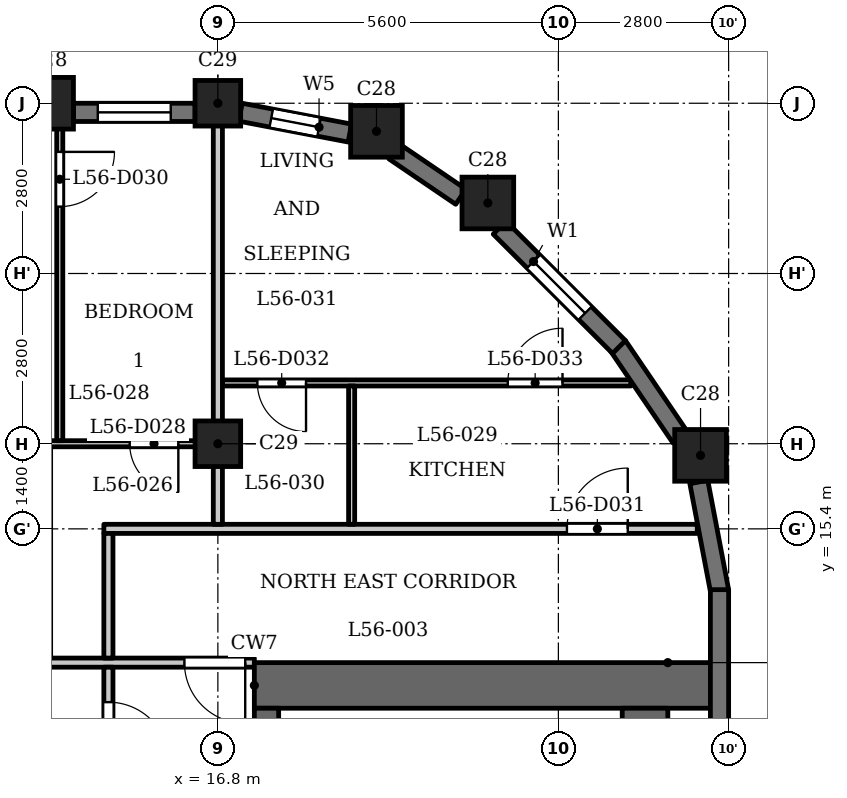
"""IFC4 building model, lengths in metres.
Left out: names, types, materials, properties, quantities, classifications, styles, units other than length and angle.
Written with IfcOpenShell. Run it as: python <this file> out.ifc"""

import sys

from ifc_helpers import new_model, si_unit, direction, frame, frame_2d, origin, origin_2d, place, context, subcontext, project, spatial, rectangle, extrude, element, fill, save


model = new_model("IFC4")
c1 = context("Model", 3, precision=1e-05, world=origin(), true_north=direction((0.0, 1.0)))
c2 = subcontext(c1, "Body", "Model", "MODEL_VIEW")
j1 = project(units=[si_unit("LENGTHUNIT", "METRE"), si_unit("PLANEANGLEUNIT", "RADIAN")], contexts=[c1])
p1 = place(None, origin())
s1 = spatial("IfcSite", under=j1, at=p1, CompositionType="ELEMENT")
p2 = place(p1, origin())
s2 = spatial("IfcBuilding", under=s1, at=p2, CompositionType="ELEMENT")
p3 = place(p2, frame((0.0, 0.0, 216.9)))
s3 = spatial("IfcBuildingStorey", under=s2, at=p3, CompositionType="ELEMENT", Elevation=216.9)
for number, where, z_axis, x_axis in (
    (1, (24.738, 16.609, 0.0), (0.0, 0.0, 1.0), (1.0, 0.0, 0.0)),
    (2, (21.24, 20.76, 0.0), (0.0, 0.0, 1.0), (1.0, 0.0, 0.0)),
    (3, (19.409, 21.938, 0.0), (0.0, 0.0, 1.0), (1.0, 0.0, 0.0)),
    (4, (14.0, 22.4, 0.0), (0.0, 0.0, 1.0), (1.0, 0.0, 0.0)),
):
    element("IfcColumn", number, at=place(p3, frame(where, z_axis=z_axis, x_axis=x_axis)), inside=s3, PredefinedType="COLUMN", context=c2, shape_type="SweptSolid", body=[
        extrude(rectangle(XDim=0.85, YDim=0.85, at=origin_2d()), origin(), (0.0, 0.0, 1.0), 3.5),
    ])
for number, where, z_axis, x_axis in (
    (5, (16.8, 16.8, 0.0), (0.0, 0.0, 1.0), (1.0, 0.0, 0.0)),
    (6, (16.8, 22.4, 0.0), (0.0, 0.0, 1.0), (1.0, 0.0, 0.0)),
):
    element("IfcColumn", number, at=place(p3, frame(where, z_axis=z_axis, x_axis=x_axis)), inside=s3, PredefinedType="COLUMN", context=c2, shape_type="SweptSolid", body=[
        extrude(rectangle(XDim=0.75, YDim=0.75, at=origin_2d()), origin(), (0.0, 0.0, 1.0), 3.5),
    ])
p4 = place(p3, frame((25.05, 11.625, 0.0), z_axis=(0.0, 0.0, 1.0), x_axis=(0.0, 1.0, 0.0)))
e7 = element("IfcWall", 7, at=p4, inside=s3, PredefinedType="SOLIDWALL", context=c2, shape_type="SweptSolid", body=[
    extrude(rectangle(XDim=2.775, YDim=0.3, at=frame_2d((1.387, 0.0))), origin(), (0.0, 0.0, 1.0), 2.5),
])
for number, where, z_axis, x_axis in (
    (8, (25.053, 14.372, 0.0), (0.0, 0.0, 1.0), (-0.187, 0.982, 0.0)),
    (9, (24.408, 16.898, 0.0), (0.0, 0.0, 1.0), (-0.562, 0.827, 0.0)),
):
    element("IfcWall", number, at=place(p3, frame(where, z_axis=z_axis, x_axis=x_axis)), inside=s3, PredefinedType="SOLIDWALL", context=c2, shape_type="SweptSolid", body=[
        extrude(rectangle(XDim=1.831, YDim=0.3, at=frame_2d((0.916, 0.0))), origin(), (0.0, 0.0, 1.0), 2.5),
    ])
p5 = place(p3, frame((23.397, 18.391, 0.0), z_axis=(0.0, 0.0, 1.0), x_axis=(-0.707106781187, 0.707106781187, 0.0)))
e10 = element("IfcWall", 10, at=p5, inside=s3, PredefinedType="SOLIDWALL", context=c2, shape_type="SweptSolid", body=[
    extrude(rectangle(XDim=2.775, YDim=0.3, at=frame_2d((1.388, 0.0))), origin(), (0.0, 0.0, 1.0), 2.5),
])
p6 = place(p5, frame((0.788, 0.0, 0.6)))
e11 = element("IfcOpeningElement", 11, at=p6, cuts=e10, PredefinedType="OPENING", context=c2, shape_type="SweptSolid", body=[
    extrude(rectangle(XDim=1.2, YDim=1.55, at=frame_2d((0.6, 0.775))), frame((0.0, 0.16, 0.0), z_axis=(0.0, -1.0, 0.0), x_axis=(1.0, 0.0, 0.0)), (0.0, 0.0, 1.0), 0.32),
])
p7 = place(p3, frame((20.796, 20.862, 0.0), z_axis=(0.0, 0.0, 1.0), x_axis=(-0.827035970432, 0.562149004813, 0.0)))
e12 = element("IfcWall", 12, at=p7, inside=s3, PredefinedType="SOLIDWALL", context=c2, shape_type="SweptSolid", body=[
    extrude(rectangle(XDim=1.327, YDim=0.3, at=frame_2d((0.664, 0.0))), origin(), (0.0, 0.0, 1.0), 2.5),
])
p8 = place(p3, frame((18.971, 21.91, 0.0), z_axis=(0.0, 0.0, 1.0), x_axis=(-0.982300037503, 0.187314271538, 0.0)))
e13 = element("IfcWall", 13, at=p8, inside=s3, PredefinedType="SOLIDWALL", context=c2, shape_type="SweptSolid", body=[
    extrude(rectangle(XDim=1.831, YDim=0.3, at=frame_2d((0.916, 0.0))), origin(), (0.0, 0.0, 1.0), 2.5),
])
p9 = place(p8, frame((0.516, 0.0, 0.6)))
e14 = element("IfcOpeningElement", 14, at=p9, cuts=e13, PredefinedType="OPENING", context=c2, shape_type="SweptSolid", body=[
    extrude(rectangle(XDim=0.8, YDim=1.55, at=frame_2d((0.4, 0.775))), frame((0.0, 0.16, 0.0), z_axis=(0.0, -1.0, 0.0), x_axis=(1.0, 0.0, 0.0)), (0.0, 0.0, 1.0), 0.32),
])
p10 = place(p3, frame((16.425, 22.25, 0.0), z_axis=(0.0, 0.0, 1.0), x_axis=(-1.0, 0.0, 0.0)))
e15 = element("IfcWall", 15, at=p10, inside=s3, PredefinedType="SOLIDWALL", context=c2, shape_type="SweptSolid", body=[
    extrude(rectangle(XDim=2.0, YDim=0.3, at=frame_2d((1.0, 0.0))), origin(), (0.0, 0.0, 1.0), 2.5),
])
p11 = place(p10, frame((0.4, 0.0, 0.6)))
e16 = element("IfcOpeningElement", 16, at=p11, cuts=e15, PredefinedType="OPENING", context=c2, shape_type="SweptSolid", body=[
    extrude(rectangle(XDim=1.2, YDim=1.55, at=frame_2d((0.6, 0.775))), frame((0.0, 0.16, 0.0), z_axis=(0.0, -1.0, 0.0), x_axis=(1.0, 0.0, 0.0)), (0.0, 0.0, 1.0), 0.32),
])
p12 = place(p3, frame((17.4, 12.825, 0.0), z_axis=(0.0, 0.0, 1.0), x_axis=(1.0, 0.0, 0.0)))
e17 = element("IfcWall", 17, at=p12, inside=s3, PredefinedType="SHEAR", context=c2, shape_type="SweptSolid", body=[
    extrude(rectangle(XDim=7.6, YDim=0.75, at=frame_2d((3.8, 0.0))), origin(), (0.0, 0.0, 1.0), 3.2),
])
p13 = place(p3, frame((17.6, -12.45, 0.0), z_axis=(0.0, 0.0, 1.0), x_axis=(0.0, 1.0, 0.0)))
e18 = element("IfcWall", 18, at=p13, inside=s3, PredefinedType="SHEAR", context=c2, shape_type="SweptSolid", body=[
    extrude(rectangle(XDim=24.9, YDim=0.4, at=frame_2d((12.45, 0.0))), origin(), (0.0, 0.0, 1.0), 3.2),
])
p14 = place(p13, frame((6.85, 0.0, 0.0)))
e19 = element("IfcOpeningElement", 19, at=p14, cuts=e18, PredefinedType="OPENING", context=c2, shape_type="SweptSolid", body=[
    extrude(rectangle(XDim=0.9, YDim=2.1, at=frame_2d((0.45, 1.05))), frame((0.0, 0.21, 0.0), z_axis=(0.0, -1.0, 0.0), x_axis=(1.0, 0.0, 0.0)), (0.0, 0.0, 1.0), 0.42),
])
p15 = place(p13, frame((10.45, 0.0, 0.0)))
e20 = element("IfcOpeningElement", 20, at=p15, cuts=e18, PredefinedType="OPENING", context=c2, shape_type="SweptSolid", body=[
    extrude(rectangle(XDim=0.9, YDim=2.1, at=frame_2d((0.45, 1.05))), frame((0.0, 0.21, 0.0), z_axis=(0.0, -1.0, 0.0), x_axis=(1.0, 0.0, 0.0)), (0.0, 0.0, 1.0), 0.42),
])
p16 = place(p13, frame((15.6, 0.0, 0.0)))
e21 = element("IfcOpeningElement", 21, at=p16, cuts=e18, PredefinedType="OPENING", context=c2, shape_type="SweptSolid", body=[
    extrude(rectangle(XDim=1.1, YDim=2.1, at=frame_2d((0.55, 1.05))), frame((0.0, 0.21, 0.0), z_axis=(0.0, -1.0, 0.0), x_axis=(1.0, 0.0, 0.0)), (0.0, 0.0, 1.0), 0.42),
])
p17 = place(p13, frame((18.0, 0.0, 0.0)))
e22 = element("IfcOpeningElement", 22, at=p17, cuts=e18, PredefinedType="OPENING", context=c2, shape_type="SweptSolid", body=[
    extrude(rectangle(XDim=1.1, YDim=2.1, at=frame_2d((0.55, 1.05))), frame((0.0, 0.21, 0.0), z_axis=(0.0, -1.0, 0.0), x_axis=(1.0, 0.0, 0.0)), (0.0, 0.0, 1.0), 0.42),
])
p18 = place(p13, frame((23.025, 0.0, 0.0)))
e23 = element("IfcOpeningElement", 23, at=p18, cuts=e18, PredefinedType="OPENING", context=c2, shape_type="SweptSolid", body=[
    extrude(rectangle(XDim=1.1, YDim=2.1, at=frame_2d((0.55, 1.05))), frame((0.0, 0.21, 0.0), z_axis=(0.0, -1.0, 0.0), x_axis=(1.0, 0.0, 0.0)), (0.0, 0.0, 1.0), 0.42),
])
p19 = place(p13, frame((0.775, 0.0, 0.0)))
e24 = element("IfcOpeningElement", 24, at=p19, cuts=e18, PredefinedType="OPENING", context=c2, shape_type="SweptSolid", body=[
    extrude(rectangle(XDim=1.1, YDim=2.1, at=frame_2d((0.55, 1.05))), frame((0.0, 0.21, 0.0), z_axis=(0.0, -1.0, 0.0), x_axis=(1.0, 0.0, 0.0)), (0.0, 0.0, 1.0), 0.42),
])
p20 = place(p13, frame((12.925, 0.0, 0.0)))
e25 = element("IfcOpeningElement", 25, at=p20, cuts=e18, PredefinedType="OPENING", context=c2, shape_type="SweptSolid", body=[
    extrude(rectangle(XDim=1.8, YDim=2.1, at=frame_2d((0.9, 1.05))), frame((0.0, 0.21, 0.0), z_axis=(0.0, -1.0, 0.0), x_axis=(1.0, 0.0, 0.0)), (0.0, 0.0, 1.0), 0.42),
])
p21 = place(p3, frame((23.825, -12.45, 0.0), z_axis=(0.0, 0.0, 1.0), x_axis=(0.0, 1.0, 0.0)))
e26 = element("IfcWall", 26, at=p21, inside=s3, PredefinedType="SHEAR", context=c2, shape_type="SweptSolid", body=[
    extrude(rectangle(XDim=24.9, YDim=0.75, at=frame_2d((12.45, 0.0))), origin(), (0.0, 0.0, 1.0), 3.2),
])
p22 = place(p3, frame((-17.4, 13.2, 0.0), z_axis=(0.0, 0.0, 1.0), x_axis=(1.0, 0.0, 0.0)))
e27 = element("IfcWall", 27, at=p22, inside=s3, PredefinedType="PARTITIONING", context=c2, shape_type="SweptSolid", body=[
    extrude(rectangle(XDim=34.8, YDim=0.15, at=frame_2d((17.4, 0.0))), origin(), (0.0, 0.0, 1.0), 3.2),
])
p23 = place(p22, frame((0.25, 0.0, 0.0)))
e28 = element("IfcOpeningElement", 28, at=p23, cuts=e27, PredefinedType="OPENING", context=c2, shape_type="SweptSolid", body=[
    extrude(rectangle(XDim=1.0, YDim=2.1, at=frame_2d((0.5, 1.05))), frame((0.0, 0.085, 0.0), z_axis=(0.0, -1.0, 0.0), x_axis=(1.0, 0.0, 0.0)), (0.0, 0.0, 1.0), 0.17),
])
p24 = place(p22, frame((33.65, 0.0, 0.0)))
e29 = element("IfcOpeningElement", 29, at=p24, cuts=e27, PredefinedType="OPENING", context=c2, shape_type="SweptSolid", body=[
    extrude(rectangle(XDim=1.0, YDim=2.1, at=frame_2d((0.5, 1.05))), frame((0.0, 0.085, 0.0), z_axis=(0.0, -1.0, 0.0), x_axis=(1.0, 0.0, 0.0)), (0.0, 0.0, 1.0), 0.17),
])
p25 = place(p22, frame((15.75, 0.0, 0.0)))
e30 = element("IfcOpeningElement", 30, at=p25, cuts=e27, PredefinedType="OPENING", context=c2, shape_type="SweptSolid", body=[
    extrude(rectangle(XDim=1.0, YDim=2.1, at=frame_2d((0.5, 1.05))), frame((0.0, 0.085, 0.0), z_axis=(0.0, -1.0, 0.0), x_axis=(1.0, 0.0, 0.0)), (0.0, 0.0, 1.0), 0.17),
])
p26 = place(p22, frame((26.95, 0.0, 0.0)))
e31 = element("IfcOpeningElement", 31, at=p26, cuts=e27, PredefinedType="OPENING", context=c2, shape_type="SweptSolid", body=[
    extrude(rectangle(XDim=1.0, YDim=2.1, at=frame_2d((0.5, 1.05))), frame((0.0, 0.085, 0.0), z_axis=(0.0, -1.0, 0.0), x_axis=(1.0, 0.0, 0.0)), (0.0, 0.0, 1.0), 0.17),
])
p27 = place(p22, frame((29.75, 0.0, 0.0)))
e32 = element("IfcOpeningElement", 32, at=p27, cuts=e27, PredefinedType="OPENING", context=c2, shape_type="SweptSolid", body=[
    extrude(rectangle(XDim=1.0, YDim=2.1, at=frame_2d((0.5, 1.05))), frame((0.0, 0.085, 0.0), z_axis=(0.0, -1.0, 0.0), x_axis=(1.0, 0.0, 0.0)), (0.0, 0.0, 1.0), 0.17),
])
p28 = place(p3, frame((14.925, 15.4, 0.0), z_axis=(0.0, 0.0, 1.0), x_axis=(1.0, 0.0, 0.0)))
e33 = element("IfcWall", 33, at=p28, inside=s3, PredefinedType="PARTITIONING", context=c2, shape_type="SweptSolid", body=[
    extrude(rectangle(XDim=9.759, YDim=0.15, at=frame_2d((4.879, 0.0))), origin(), (0.0, 0.0, 1.0), 3.2),
])
p29 = place(p28, frame((7.616, 0.0, 0.0)))
e34 = element("IfcOpeningElement", 34, at=p29, cuts=e33, PredefinedType="OPENING", context=c2, shape_type="SweptSolid", body=[
    extrude(rectangle(XDim=1.0, YDim=2.1, at=frame_2d((0.5, 1.05))), frame((0.0, 0.085, 0.0), z_axis=(0.0, -1.0, 0.0), x_axis=(1.0, 0.0, 0.0)), (0.0, 0.0, 1.0), 0.17),
])
p30 = place(p3, frame((-16.725, 16.8, 0.0), z_axis=(0.0, 0.0, 1.0), x_axis=(1.0, 0.0, 0.0)))
e35 = element("IfcWall", 35, at=p30, inside=s3, PredefinedType="PARTITIONING", context=c2, shape_type="SweptSolid", body=[
    extrude(rectangle(XDim=33.45, YDim=0.1, at=frame_2d((16.725, 0.0))), origin(), (0.0, 0.0, 1.0), 3.2),
])
p31 = place(p30, frame((11.675, 0.0, 0.0)))
e36 = element("IfcOpeningElement", 36, at=p31, cuts=e35, PredefinedType="OPENING", context=c2, shape_type="SweptSolid", body=[
    extrude(rectangle(XDim=0.9, YDim=2.1, at=frame_2d((0.45, 1.05))), frame((0.0, 0.06, 0.0), z_axis=(0.0, -1.0, 0.0), x_axis=(1.0, 0.0, 0.0)), (0.0, 0.0, 1.0), 0.12),
])
p32 = place(p30, frame((9.575, 0.0, 0.0)))
e37 = element("IfcOpeningElement", 37, at=p32, cuts=e35, PredefinedType="OPENING", context=c2, shape_type="SweptSolid", body=[
    extrude(rectangle(XDim=0.9, YDim=2.1, at=frame_2d((0.45, 1.05))), frame((0.0, 0.06, 0.0), z_axis=(0.0, -1.0, 0.0), x_axis=(1.0, 0.0, 0.0)), (0.0, 0.0, 1.0), 0.12),
])
p33 = place(p30, frame((17.375, 0.0, 0.0)))
e38 = element("IfcOpeningElement", 38, at=p33, cuts=e35, PredefinedType="OPENING", context=c2, shape_type="SweptSolid", body=[
    extrude(rectangle(XDim=0.8, YDim=2.1, at=frame_2d((0.4, 1.05))), frame((0.0, 0.06, 0.0), z_axis=(0.0, -1.0, 0.0), x_axis=(1.0, 0.0, 0.0)), (0.0, 0.0, 1.0), 0.12),
])
p34 = place(p30, frame((19.525, 0.0, 0.0)))
e39 = element("IfcOpeningElement", 39, at=p34, cuts=e35, PredefinedType="OPENING", context=c2, shape_type="SweptSolid", body=[
    extrude(rectangle(XDim=0.9, YDim=2.1, at=frame_2d((0.45, 1.05))), frame((0.0, 0.06, 0.0), z_axis=(0.0, -1.0, 0.0), x_axis=(1.0, 0.0, 0.0)), (0.0, 0.0, 1.0), 0.12),
])
p35 = place(p30, frame((23.775, 0.0, 0.0)))
e40 = element("IfcOpeningElement", 40, at=p35, cuts=e35, PredefinedType="OPENING", context=c2, shape_type="SweptSolid", body=[
    extrude(rectangle(XDim=0.9, YDim=2.1, at=frame_2d((0.45, 1.05))), frame((0.0, 0.06, 0.0), z_axis=(0.0, -1.0, 0.0), x_axis=(1.0, 0.0, 0.0)), (0.0, 0.0, 1.0), 0.12),
])
p36 = place(p30, frame((26.125, 0.0, 0.0)))
e41 = element("IfcOpeningElement", 41, at=p36, cuts=e35, PredefinedType="OPENING", context=c2, shape_type="SweptSolid", body=[
    extrude(rectangle(XDim=0.9, YDim=2.1, at=frame_2d((0.45, 1.05))), frame((0.0, 0.06, 0.0), z_axis=(0.0, -1.0, 0.0), x_axis=(1.0, 0.0, 0.0)), (0.0, 0.0, 1.0), 0.12),
])
p37 = place(p30, frame((32.075, 0.0, 0.0)))
e42 = element("IfcOpeningElement", 42, at=p37, cuts=e35, PredefinedType="OPENING", context=c2, shape_type="SweptSolid", body=[
    extrude(rectangle(XDim=0.8, YDim=2.1, at=frame_2d((0.4, 1.05))), frame((0.0, 0.06, 0.0), z_axis=(0.0, -1.0, 0.0), x_axis=(1.0, 0.0, 0.0)), (0.0, 0.0, 1.0), 0.12),
])
p38 = place(p30, frame((29.175, 0.0, 0.0)))
e43 = element("IfcOpeningElement", 43, at=p38, cuts=e35, PredefinedType="OPENING", context=c2, shape_type="SweptSolid", body=[
    extrude(rectangle(XDim=0.9, YDim=2.1, at=frame_2d((0.45, 1.05))), frame((0.0, 0.06, 0.0), z_axis=(0.0, -1.0, 0.0), x_axis=(1.0, 0.0, 0.0)), (0.0, 0.0, 1.0), 0.12),
])
p39 = place(p3, frame((16.875, 17.8, 0.0), z_axis=(0.0, 0.0, 1.0), x_axis=(1.0, 0.0, 0.0)))
e44 = element("IfcWall", 44, at=p39, inside=s3, PredefinedType="PARTITIONING", context=c2, shape_type="SweptSolid", body=[
    extrude(rectangle(XDim=6.719, YDim=0.1, at=frame_2d((3.359, 0.0))), origin(), (0.0, 0.0, 1.0), 3.2),
])
p40 = place(p39, frame((0.575, 0.0, 0.0)))
e45 = element("IfcOpeningElement", 45, at=p40, cuts=e44, PredefinedType="OPENING", context=c2, shape_type="SweptSolid", body=[
    extrude(rectangle(XDim=0.8, YDim=2.1, at=frame_2d((0.4, 1.05))), frame((0.0, 0.06, 0.0), z_axis=(0.0, -1.0, 0.0), x_axis=(1.0, 0.0, 0.0)), (0.0, 0.0, 1.0), 0.12),
])
p41 = place(p39, frame((4.693, 0.0, 0.0)))
e46 = element("IfcOpeningElement", 46, at=p41, cuts=e44, PredefinedType="OPENING", context=c2, shape_type="SweptSolid", body=[
    extrude(rectangle(XDim=0.9, YDim=2.1, at=frame_2d((0.45, 1.05))), frame((0.0, 0.06, 0.0), z_axis=(0.0, -1.0, 0.0), x_axis=(1.0, 0.0, 0.0)), (0.0, 0.0, 1.0), 0.12),
])
p42 = place(p3, frame((14.2, 16.85, 0.0), z_axis=(0.0, 0.0, 1.0), x_axis=(0.0, 1.0, 0.0)))
e47 = element("IfcWall", 47, at=p42, inside=s3, PredefinedType="PARTITIONING", context=c2, shape_type="SweptSolid", body=[
    extrude(rectangle(XDim=5.46, YDim=0.1, at=frame_2d((2.73, 0.0))), origin(), (0.0, 0.0, 1.0), 3.2),
])
p43 = place(p42, frame((3.85, 0.0, 0.0)))
e48 = element("IfcOpeningElement", 48, at=p43, cuts=e47, PredefinedType="OPENING", context=c2, shape_type="SweptSolid", body=[
    extrude(rectangle(XDim=0.9, YDim=2.1, at=frame_2d((0.45, 1.05))), frame((0.0, 0.06, 0.0), z_axis=(0.0, -1.0, 0.0), x_axis=(1.0, 0.0, 0.0)), (0.0, 0.0, 1.0), 0.12),
])
p44 = place(p3, frame((15.0, 6.769, 0.0), z_axis=(0.0, 0.0, 1.0), x_axis=(0.0, 1.0, 0.0)))
e49 = element("IfcWall", 49, at=p44, inside=s3, PredefinedType="PARTITIONING", context=c2, shape_type="SweptSolid", body=[
    extrude(rectangle(XDim=6.356, YDim=0.15, at=frame_2d((3.178, 0.0))), origin(), (0.0, 0.0, 1.0), 3.2),
])
p45 = place(p44, frame((4.781, 0.0, 0.0)))
e50 = element("IfcOpeningElement", 50, at=p45, cuts=e49, PredefinedType="OPENING", context=c2, shape_type="SweptSolid", body=[
    extrude(rectangle(XDim=1.0, YDim=2.1, at=frame_2d((0.5, 1.05))), frame((0.0, 0.085, 0.0), z_axis=(0.0, -1.0, 0.0), x_axis=(1.0, 0.0, 0.0)), (0.0, 0.0, 1.0), 0.17),
])
p46 = place(p3, frame((15.0, 13.275, 0.0), z_axis=(0.0, 0.0, 1.0), x_axis=(0.0, 1.0, 0.0)))
e51 = element("IfcWall", 51, at=p46, inside=s3, PredefinedType="PARTITIONING", context=c2, shape_type="SweptSolid", body=[
    extrude(rectangle(XDim=2.05, YDim=0.15, at=frame_2d((1.025, 0.0))), origin(), (0.0, 0.0, 1.0), 3.2),
])
p47 = place(p3, frame((16.8, 15.475, 0.0), z_axis=(0.0, 0.0, 1.0), x_axis=(0.0, 1.0, 0.0)))
e52 = element("IfcWall", 52, at=p47, inside=s3, PredefinedType="PARTITIONING", context=c2, shape_type="SweptSolid", body=[
    extrude(rectangle(XDim=6.835, YDim=0.15, at=frame_2d((3.417, 0.0))), origin(), (0.0, 0.0, 1.0), 2.55),
])
p48 = place(p3, frame((19.0, 15.475, 0.0), z_axis=(0.0, 0.0, 1.0), x_axis=(0.0, 1.0, 0.0)))
e53 = element("IfcWall", 53, at=p48, inside=s3, PredefinedType="PARTITIONING", context=c2, shape_type="SweptSolid", body=[
    extrude(rectangle(XDim=2.275, YDim=0.1, at=frame_2d((1.137, 0.0))), origin(), (0.0, 0.0, 1.0), 3.2),
])
p49 = place(p45, origin())
e54 = element("IfcDoor", 54, at=p49, inside=s3, OperationType="SINGLE_SWING_LEFT", PredefinedType="DOOR", context=c2, shape_type="SweptSolid", body=[
    extrude(rectangle(XDim=1.0, YDim=2.1, at=frame_2d((0.5, 1.05))), frame((0.0, 0.025, 0.0), z_axis=(0.0, -1.0, 0.0), x_axis=(1.0, 0.0, 0.0)), (0.0, 0.0, 1.0), 0.05),
])
fill(e50, e54)
p50 = place(p24, origin())
e55 = element("IfcDoor", 55, at=p50, inside=s3, OperationType="SINGLE_SWING_RIGHT", PredefinedType="DOOR", context=c2, shape_type="SweptSolid", body=[
    extrude(rectangle(XDim=1.0, YDim=2.1, at=frame_2d((0.5, 1.05))), frame((0.0, 0.025, 0.0), z_axis=(0.0, -1.0, 0.0), x_axis=(1.0, 0.0, 0.0)), (0.0, 0.0, 1.0), 0.05),
])
fill(e29, e55)
p51 = place(p37, origin())
e56 = element("IfcDoor", 56, at=p51, inside=s3, OperationType="SINGLE_SWING_RIGHT", PredefinedType="DOOR", context=c2, shape_type="SweptSolid", body=[
    extrude(rectangle(XDim=0.8, YDim=2.1, at=frame_2d((0.4, 1.05))), frame((0.0, 0.025, 0.0), z_axis=(0.0, -1.0, 0.0), x_axis=(1.0, 0.0, 0.0)), (0.0, 0.0, 1.0), 0.05),
])
fill(e42, e56)
p52 = place(p43, origin())
e57 = element("IfcDoor", 57, at=p52, inside=s3, OperationType="SINGLE_SWING_RIGHT", PredefinedType="DOOR", context=c2, shape_type="SweptSolid", body=[
    extrude(rectangle(XDim=0.9, YDim=2.1, at=frame_2d((0.45, 1.05))), frame((0.0, 0.025, 0.0), z_axis=(0.0, -1.0, 0.0), x_axis=(1.0, 0.0, 0.0)), (0.0, 0.0, 1.0), 0.05),
])
fill(e48, e57)
p53 = place(p29, origin())
e58 = element("IfcDoor", 58, at=p53, inside=s3, OperationType="SINGLE_SWING_LEFT", PredefinedType="DOOR", context=c2, shape_type="SweptSolid", body=[
    extrude(rectangle(XDim=1.0, YDim=2.1, at=frame_2d((0.5, 1.05))), frame((0.0, 0.025, 0.0), z_axis=(0.0, -1.0, 0.0), x_axis=(1.0, 0.0, 0.0)), (0.0, 0.0, 1.0), 0.05),
])
fill(e34, e58)
p54 = place(p40, origin())
e59 = element("IfcDoor", 59, at=p54, inside=s3, OperationType="SINGLE_SWING_RIGHT", PredefinedType="DOOR", context=c2, shape_type="SweptSolid", body=[
    extrude(rectangle(XDim=0.8, YDim=2.1, at=frame_2d((0.4, 1.05))), frame((0.0, 0.025, 0.0), z_axis=(0.0, -1.0, 0.0), x_axis=(1.0, 0.0, 0.0)), (0.0, 0.0, 1.0), 0.05),
])
fill(e45, e59)
p55 = place(p41, origin())
e60 = element("IfcDoor", 60, at=p55, inside=s3, OperationType="SINGLE_SWING_LEFT", PredefinedType="DOOR", context=c2, shape_type="SweptSolid", body=[
    extrude(rectangle(XDim=0.9, YDim=2.1, at=frame_2d((0.45, 1.05))), frame((0.0, 0.025, 0.0), z_axis=(0.0, -1.0, 0.0), x_axis=(1.0, 0.0, 0.0)), (0.0, 0.0, 1.0), 0.05),
])
fill(e46, e60)
p56 = place(p6, origin())
e61 = element("IfcWindow", 61, at=p56, inside=s3, PartitioningType="SINGLE_PANEL", PredefinedType="WINDOW", context=c2, shape_type="SweptSolid", body=[
    extrude(rectangle(XDim=1.2, YDim=1.55, at=frame_2d((0.6, 0.775))), frame((0.0, 0.03, 0.0), z_axis=(0.0, -1.0, 0.0), x_axis=(1.0, 0.0, 0.0)), (0.0, 0.0, 1.0), 0.06),
])
fill(e11, e61)
p57 = place(p9, origin())
e62 = element("IfcWindow", 62, at=p57, inside=s3, PartitioningType="SINGLE_PANEL", PredefinedType="WINDOW", context=c2, shape_type="SweptSolid", body=[
    extrude(rectangle(XDim=0.8, YDim=1.55, at=frame_2d((0.4, 0.775))), frame((0.0, 0.03, 0.0), z_axis=(0.0, -1.0, 0.0), x_axis=(1.0, 0.0, 0.0)), (0.0, 0.0, 1.0), 0.06),
])
fill(e14, e62)
p58 = place(p11, origin())
e63 = element("IfcWindow", 63, at=p58, inside=s3, PartitioningType="SINGLE_PANEL", PredefinedType="WINDOW", context=c2, shape_type="SweptSolid", body=[
    extrude(rectangle(XDim=1.2, YDim=1.55, at=frame_2d((0.6, 0.775))), frame((0.0, 0.03, 0.0), z_axis=(0.0, -1.0, 0.0), x_axis=(1.0, 0.0, 0.0)), (0.0, 0.0, 1.0), 0.06),
])
fill(e16, e63)
save(model, sys.argv[1])
